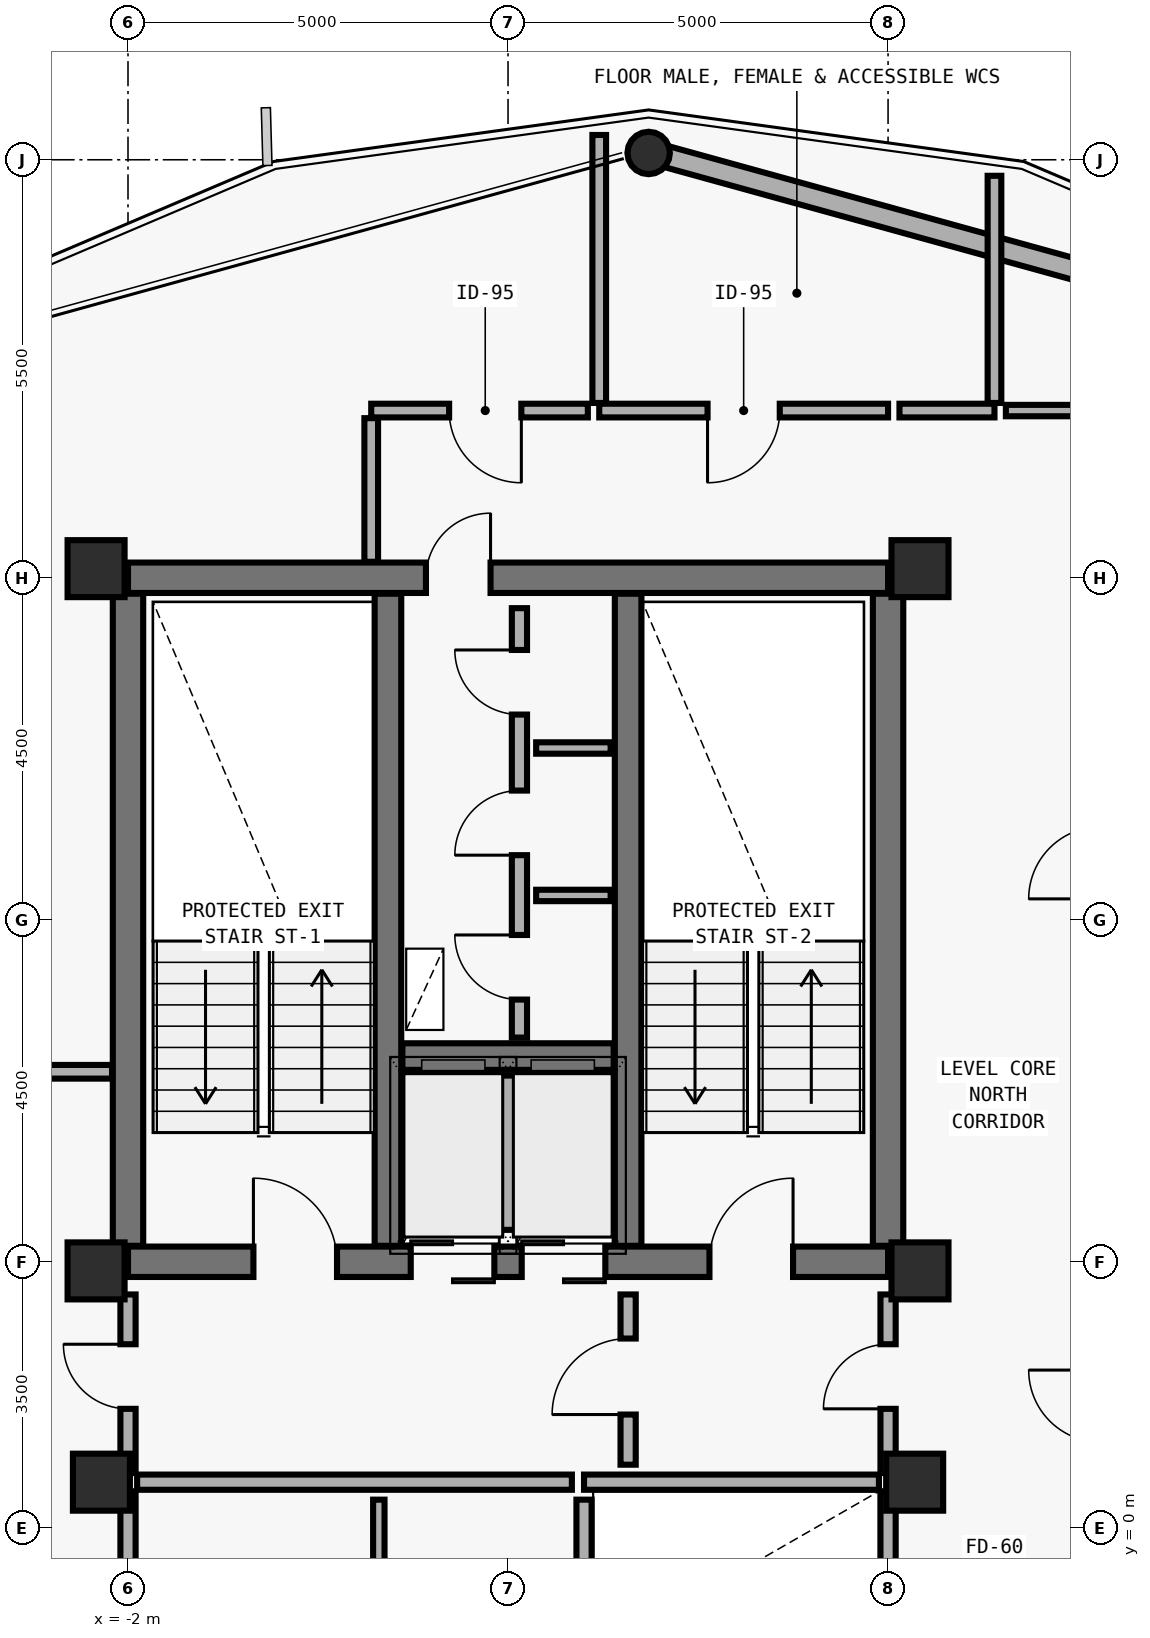
"""IFC4 building model, lengths in metres.
Left out: names, types, materials, properties, quantities, classifications, styles, units other than length and angle.
Written with IfcOpenShell. Run it as: python <this file> out.ifc"""

import sys

from ifc_helpers import new_model, si_unit, direction, frame, frame_2d, origin, origin_2d, place, context, subcontext, project, spatial, rectangle, hollow_circle, extrude, element, fill, save


model = new_model("IFC4")
c1 = context("Model", 3, precision=1e-05, world=origin(), true_north=direction((0.0, 1.0)))
c2 = subcontext(c1, "Body", "Model", "MODEL_VIEW")
j1 = project(units=[si_unit("LENGTHUNIT", "METRE"), si_unit("PLANEANGLEUNIT", "RADIAN")], contexts=[c1])
p1 = place(None, origin())
s1 = spatial("IfcSite", under=j1, at=p1, CompositionType="ELEMENT")
p2 = place(p1, origin())
s2 = spatial("IfcBuilding", under=s1, at=p2, CompositionType="ELEMENT")
p3 = place(p2, frame((0.0, 0.0, 245.4)))
s3 = spatial("IfcBuildingStorey", under=s2, at=p3, CompositionType="ELEMENT", Elevation=245.4)
p4 = place(p3, frame((-2.0, 3.5, 0.0), z_axis=(0.0, 0.0, 1.0), x_axis=(1.0, 0.0, 0.0)))
e1 = element("IfcWall", 1, at=p4, inside=s3, PredefinedType="SHEAR", context=c2, shape_type="SweptSolid", body=[
    extrude(rectangle(XDim=10.0, YDim=0.4, at=frame_2d((5.0, 0.0))), origin(), (0.0, 0.0, 1.0), 3.592),
])
p5 = place(p4, frame((1.65, 0.0, 0.0)))
e2 = element("IfcOpeningElement", 2, at=p5, cuts=e1, PredefinedType="OPENING", context=c2, shape_type="SweptSolid", body=[
    extrude(rectangle(XDim=1.1, YDim=2.15, at=frame_2d((0.55, 1.075))), frame((0.0, 0.21, 0.0), z_axis=(0.0, -1.0, 0.0), x_axis=(1.0, 0.0, 0.0)), (0.0, 0.0, 1.0), 0.42),
])
p6 = place(p4, frame((7.65, 0.0, 0.0)))
e3 = element("IfcOpeningElement", 3, at=p6, cuts=e1, PredefinedType="OPENING", context=c2, shape_type="SweptSolid", body=[
    extrude(rectangle(XDim=1.1, YDim=2.15, at=frame_2d((0.55, 1.075))), frame((0.0, 0.21, 0.0), z_axis=(0.0, -1.0, 0.0), x_axis=(1.0, 0.0, 0.0)), (0.0, 0.0, 1.0), 0.42),
])
p7 = place(p4, frame((3.72, 0.0, 0.0)))
e4 = element("IfcOpeningElement", 4, at=p7, cuts=e1, PredefinedType="OPENING", context=c2, shape_type="SweptSolid", body=[
    extrude(rectangle(XDim=1.1, YDim=2.2, at=frame_2d((0.55, 1.1))), frame((0.0, 0.21, 0.0), z_axis=(0.0, -1.0, 0.0), x_axis=(1.0, 0.0, 0.0)), (0.0, 0.0, 1.0), 0.42),
])
p8 = place(p4, frame((5.18, 0.0, 0.0)))
e5 = element("IfcOpeningElement", 5, at=p8, cuts=e1, PredefinedType="OPENING", context=c2, shape_type="SweptSolid", body=[
    extrude(rectangle(XDim=1.1, YDim=2.2, at=frame_2d((0.55, 1.1))), frame((0.0, 0.21, 0.0), z_axis=(0.0, -1.0, 0.0), x_axis=(1.0, 0.0, 0.0)), (0.0, 0.0, 1.0), 0.42),
])
p9 = place(p3, frame((-2.0, 12.5, 0.0), z_axis=(0.0, 0.0, 1.0), x_axis=(1.0, 0.0, 0.0)))
e6 = element("IfcWall", 6, at=p9, inside=s3, PredefinedType="SHEAR", context=c2, shape_type="SweptSolid", body=[
    extrude(rectangle(XDim=10.0, YDim=0.4, at=frame_2d((5.0, 0.0))), origin(), (0.0, 0.0, 1.0), 3.592),
])
p10 = place(p9, frame((3.92, 0.0, 0.0)))
e7 = element("IfcOpeningElement", 7, at=p10, cuts=e6, PredefinedType="OPENING", context=c2, shape_type="SweptSolid", body=[
    extrude(rectangle(XDim=0.85, YDim=2.1, at=frame_2d((0.425, 1.05))), frame((0.0, 0.21, 0.0), z_axis=(0.0, -1.0, 0.0), x_axis=(1.0, 0.0, 0.0)), (0.0, 0.0, 1.0), 0.42),
])
for number, where, z_axis, x_axis in (
    (8, (-2.0, 3.71, 0.0), (0.0, 0.0, 1.0), (0.0, 1.0, 0.0)),
    (9, (8.0, 3.71, 0.0), (0.0, 0.0, 1.0), (0.0, 1.0, 0.0)),
):
    element("IfcWall", number, at=place(p3, frame(where, z_axis=z_axis, x_axis=x_axis)), inside=s3, PredefinedType="SHEAR", context=c2, shape_type="SweptSolid", body=[
        extrude(rectangle(XDim=8.58, YDim=0.4, at=frame_2d((4.29, 0.0))), origin(), (0.0, 0.0, 1.0), 3.592),
    ])
for number, where, z_axis, x_axis in (
    (10, (1.42, 3.71, 0.0), (0.0, 0.0, 1.0), (0.0, 1.0, 0.0)),
    (11, (4.58, 3.71, 0.0), (0.0, 0.0, 1.0), (0.0, 1.0, 0.0)),
):
    element("IfcWall", number, at=place(p3, frame(where, z_axis=z_axis, x_axis=x_axis)), inside=s3, PredefinedType="SHEAR", context=c2, shape_type="SweptSolid", body=[
        extrude(rectangle(XDim=8.58, YDim=0.35, at=frame_2d((4.29, 0.0))), origin(), (0.0, 0.0, 1.0), 3.592),
    ])
p11 = place(p3, frame((1.61, 6.2, 0.0), z_axis=(0.0, 0.0, 1.0), x_axis=(1.0, 0.0, 0.0)))
e12 = element("IfcWall", 12, at=p11, inside=s3, PredefinedType="SHEAR", context=c2, shape_type="SweptSolid", body=[
    extrude(rectangle(XDim=2.78, YDim=0.35, at=frame_2d((1.39, 0.0))), origin(), (0.0, 0.0, 1.0), 3.592),
])
for number, where, z_axis, x_axis in (
    (13, (-2.42, 12.62, 0.0), (0.0, 0.0, 1.0), (1.0, 0.0, 0.0)),
    (14, (8.42, 12.62, 0.0), (0.0, 0.0, 1.0), (1.0, 0.0, 0.0)),
    (15, (-2.42, 3.38, 0.0), (0.0, 0.0, 1.0), (1.0, 0.0, 0.0)),
    (16, (8.42, 3.38, 0.0), (0.0, 0.0, 1.0), (1.0, 0.0, 0.0)),
    (17, (-2.35, 0.6, 0.0), (0.0, 0.0, 1.0), (1.0, 0.0, 0.0)),
    (18, (8.35, 0.6, 0.0), (0.0, 0.0, 1.0), (1.0, 0.0, 0.0)),
):
    element("IfcColumn", number, at=place(p3, frame(where, z_axis=z_axis, x_axis=x_axis)), inside=s3, PredefinedType="COLUMN", context=c2, shape_type="SweptSolid", body=[
        extrude(rectangle(XDim=0.75, YDim=0.75, at=origin_2d()), origin(), (0.0, 0.0, 1.0), 3.575),
    ])
p12 = place(p3, frame((4.85, 18.106, 0.0), z_axis=(0.0, -0.00921840097, 0.999957509639), x_axis=(1.0, 0.0, 0.0)))
e19 = element("IfcColumn", 19, at=p12, inside=s3, PredefinedType="COLUMN", context=c2, shape_type="SweptSolid", body=[
    extrude(hollow_circle(Radius=0.28, WallThickness=0.02, at=origin_2d()), origin(), (0.0, 0.0, 1.0), 3.575),
])
p13 = place(p3, frame((5.076, 18.044, 0.0), z_axis=(0.0, 0.0, 1.0), x_axis=(0.963966020106, -0.266025397435, 0.0)))
e20 = element("IfcWall", 20, at=p13, inside=s3, PredefinedType="SOLIDWALL", context=c2, shape_type="SweptSolid", body=[
    extrude(rectangle(XDim=9.089, YDim=0.28, at=frame_2d((4.545, 0.0))), origin(), (0.0, 0.0, 1.0), 2.97),
])
p14 = place(p3, frame((3.0, 3.92, 0.0), z_axis=(0.0, 0.0, 1.0), x_axis=(0.0, 1.0, 0.0)))
e21 = element("IfcWall", 21, at=p14, inside=s3, PredefinedType="SOLIDWALL", context=c2, shape_type="SweptSolid", body=[
    extrude(rectangle(XDim=2.03, YDim=0.2, at=frame_2d((1.015, 0.0))), origin(), (0.0, 0.0, 1.0), 3.36),
])
p15 = place(p3, frame((4.0, 0.6, 0.0), z_axis=(0.0, 0.0, 1.0), x_axis=(1.0, 0.0, 0.0)))
e22 = element("IfcWall", 22, at=p15, inside=s3, PredefinedType="SOLIDWALL", context=c2, shape_type="SweptSolid", body=[
    extrude(rectangle(XDim=3.88, YDim=0.2, at=frame_2d((1.94, 0.0))), origin(), (0.0, 0.0, 1.0), 3.072),
])
p16 = place(p3, frame((4.0, -1.57, 0.0), z_axis=(0.0, 0.0, 1.0), x_axis=(0.0, 1.0, 0.0)))
e23 = element("IfcWall", 23, at=p16, inside=s3, PredefinedType="SOLIDWALL", context=c2, shape_type="SweptSolid", body=[
    extrude(rectangle(XDim=1.94, YDim=0.2, at=frame_2d((0.97, 0.0))), origin(), (0.0, 0.0, 1.0), 3.36),
])
p17 = place(p3, frame((8.0, -1.57, 0.0), z_axis=(0.0, 0.0, 1.0), x_axis=(0.0, 1.0, 0.0)))
e24 = element("IfcWall", 24, at=p17, inside=s3, PredefinedType="SOLIDWALL", context=c2, shape_type="SweptSolid", body=[
    extrude(rectangle(XDim=2.05, YDim=0.2, at=frame_2d((1.025, 0.0))), origin(), (0.0, 0.0, 1.0), 3.072),
])
p18 = place(p3, frame((3.15, 6.45, 0.0), z_axis=(0.0, 0.0, 1.0), x_axis=(0.0, 1.0, 0.0)))
e25 = element("IfcWall", 25, at=p18, inside=s3, PredefinedType="MOVABLE", context=c2, shape_type="SweptSolid", body=[
    extrude(rectangle(XDim=5.65, YDim=0.2, at=frame_2d((2.825, 0.0))), origin(), (0.0, 0.0, 1.0), 3.36),
])
p19 = place(p18, frame((0.5, 0.0, 0.0)))
e26 = element("IfcOpeningElement", 26, at=p19, cuts=e25, PredefinedType="OPENING", context=c2, shape_type="SweptSolid", body=[
    extrude(rectangle(XDim=0.85, YDim=2.1, at=frame_2d((0.425, 1.05))), frame((0.0, 0.11, 0.0), z_axis=(0.0, -1.0, 0.0), x_axis=(1.0, 0.0, 0.0)), (0.0, 0.0, 1.0), 0.22),
])
p20 = place(p18, frame((2.4, 0.0, 0.0)))
e27 = element("IfcOpeningElement", 27, at=p20, cuts=e25, PredefinedType="OPENING", context=c2, shape_type="SweptSolid", body=[
    extrude(rectangle(XDim=0.85, YDim=2.1, at=frame_2d((0.425, 1.05))), frame((0.0, 0.11, 0.0), z_axis=(0.0, -1.0, 0.0), x_axis=(1.0, 0.0, 0.0)), (0.0, 0.0, 1.0), 0.22),
])
p21 = place(p18, frame((4.25, 0.0, 0.0)))
e28 = element("IfcOpeningElement", 28, at=p21, cuts=e25, PredefinedType="OPENING", context=c2, shape_type="SweptSolid", body=[
    extrude(rectangle(XDim=0.85, YDim=2.1, at=frame_2d((0.425, 1.05))), frame((0.0, 0.11, 0.0), z_axis=(0.0, -1.0, 0.0), x_axis=(1.0, 0.0, 0.0)), (0.0, 0.0, 1.0), 0.22),
])
p22 = place(p3, frame((4.58, 0.83, 0.0), z_axis=(0.0, 0.0, 1.0), x_axis=(0.0, 1.0, 0.0)))
e29 = element("IfcWall", 29, at=p22, inside=s3, PredefinedType="MOVABLE", context=c2, shape_type="SweptSolid", body=[
    extrude(rectangle(XDim=2.24, YDim=0.2, at=frame_2d((1.12, 0.0))), origin(), (0.0, 0.0, 1.0), 3.36),
])
p23 = place(p22, frame((0.66, 0.0, 0.0)))
e30 = element("IfcOpeningElement", 30, at=p23, cuts=e29, PredefinedType="OPENING", context=c2, shape_type="SweptSolid", body=[
    extrude(rectangle(XDim=1.0, YDim=2.1, at=frame_2d((0.5, 1.05))), frame((0.0, 0.11, 0.0), z_axis=(0.0, -1.0, 0.0), x_axis=(1.0, 0.0, 0.0)), (0.0, 0.0, 1.0), 0.22),
])
p24 = place(p3, frame((-2.0, 0.72, 0.0), z_axis=(0.0, 0.0, 1.0), x_axis=(0.0, 1.0, 0.0)))
e31 = element("IfcWall", 31, at=p24, inside=s3, PredefinedType="MOVABLE", context=c2, shape_type="SweptSolid", body=[
    extrude(rectangle(XDim=2.35, YDim=0.2, at=frame_2d((1.175, 0.0))), origin(), (0.0, 0.0, 1.0), 2.692),
])
p25 = place(p24, frame((0.845, 0.0, 0.0)))
e32 = element("IfcOpeningElement", 32, at=p25, cuts=e31, PredefinedType="OPENING", context=c2, shape_type="SweptSolid", body=[
    extrude(rectangle(XDim=0.85, YDim=2.1, at=frame_2d((0.425, 1.05))), frame((0.0, 0.11, 0.0), z_axis=(0.0, -1.0, 0.0), x_axis=(1.0, 0.0, 0.0)), (0.0, 0.0, 1.0), 0.22),
])
p26 = place(p3, frame((8.0, 0.72, 0.0), z_axis=(0.0, 0.0, 1.0), x_axis=(0.0, 1.0, 0.0)))
e33 = element("IfcWall", 33, at=p26, inside=s3, PredefinedType="MOVABLE", context=c2, shape_type="SweptSolid", body=[
    extrude(rectangle(XDim=2.35, YDim=0.2, at=frame_2d((1.175, 0.0))), origin(), (0.0, 0.0, 1.0), 2.692),
])
p27 = place(p26, frame((0.845, 0.0, 0.0)))
e34 = element("IfcOpeningElement", 34, at=p27, cuts=e33, PredefinedType="OPENING", context=c2, shape_type="SweptSolid", body=[
    extrude(rectangle(XDim=0.85, YDim=2.1, at=frame_2d((0.425, 1.05))), frame((0.0, 0.11, 0.0), z_axis=(0.0, -1.0, 0.0), x_axis=(1.0, 0.0, 0.0)), (0.0, 0.0, 1.0), 0.22),
])
p28 = place(p3, frame((8.0, 14.7, 0.0), z_axis=(0.0, 0.0, 1.0), x_axis=(-1.0, 0.0, 0.0)))
e35 = element("IfcWall", 35, at=p28, inside=s3, PredefinedType="PLUMBINGWALL", context=c2, shape_type="SweptSolid", body=[
    extrude(rectangle(XDim=3.8, YDim=0.18, at=frame_2d((1.9, 0.0))), origin(), (0.0, 0.0, 1.0), 3.072),
])
p29 = place(p28, frame((1.425, 0.0, 0.0)))
e36 = element("IfcOpeningElement", 36, at=p29, cuts=e35, PredefinedType="OPENING", context=c2, shape_type="SweptSolid", body=[
    extrude(rectangle(XDim=0.95, YDim=2.1, at=frame_2d((0.475, 1.05))), frame((0.0, 0.1, 0.0), z_axis=(0.0, -1.0, 0.0), x_axis=(1.0, 0.0, 0.0)), (0.0, 0.0, 1.0), 0.2),
])
p30 = place(p3, frame((4.05, 14.7, 0.0), z_axis=(0.0, 0.0, 1.0), x_axis=(-1.0, 0.0, 0.0)))
e37 = element("IfcWall", 37, at=p30, inside=s3, PredefinedType="PLUMBINGWALL", context=c2, shape_type="SweptSolid", body=[
    extrude(rectangle(XDim=2.85, YDim=0.18, at=frame_2d((1.425, 0.0))), origin(), (0.0, 0.0, 1.0), 3.072),
])
p31 = place(p30, frame((0.875, 0.0, 0.0)))
e38 = element("IfcOpeningElement", 38, at=p31, cuts=e37, PredefinedType="OPENING", context=c2, shape_type="SweptSolid", body=[
    extrude(rectangle(XDim=0.95, YDim=2.1, at=frame_2d((0.475, 1.05))), frame((0.0, 0.1, 0.0), z_axis=(0.0, -1.0, 0.0), x_axis=(1.0, 0.0, 0.0)), (0.0, 0.0, 1.0), 0.2),
])
for number, where, z_axis, x_axis in (
    (39, (3.37, 8.32, 0.0), (0.0, 0.0, 1.0), (1.0, 0.0, 0.0)),
    (40, (3.37, 10.26, 0.0), (0.0, 0.0, 1.0), (1.0, 0.0, 0.0)),
):
    element("IfcWall", number, at=place(p3, frame(where, z_axis=z_axis, x_axis=x_axis)), inside=s3, PredefinedType="PARTITIONING", context=c2, shape_type="SweptSolid", body=[
        extrude(rectangle(XDim=0.98, YDim=0.15, at=frame_2d((0.49, 0.0))), origin(), (0.0, 0.0, 1.0), 3.36),
    ])
p32 = place(p3, frame((-1.88, 0.6, 0.0), z_axis=(0.0, 0.0, 1.0), x_axis=(1.0, 0.0, 0.0)))
e41 = element("IfcWall", 41, at=p32, inside=s3, PredefinedType="MOVABLE", context=c2, shape_type="SweptSolid", body=[
    extrude(rectangle(XDim=5.72, YDim=0.2, at=frame_2d((2.86, 0.0))), origin(), (0.0, 0.0, 1.0), 3.072),
])
p33 = place(p3, frame((1.3, -1.57, 0.0), z_axis=(0.0, 0.0, 1.0), x_axis=(0.0, 1.0, 0.0)))
e42 = element("IfcWall", 42, at=p33, inside=s3, PredefinedType="PARTITIONING", context=c2, shape_type="SweptSolid", body=[
    extrude(rectangle(XDim=1.94, YDim=0.15, at=frame_2d((0.97, 0.0))), origin(), (0.0, 0.0, 1.0), 3.36),
])
p34 = place(p3, frame((-2.0, -1.68, 0.0), z_axis=(0.0, 0.0, 1.0), x_axis=(0.0, 1.0, 0.0)))
e43 = element("IfcWall", 43, at=p34, inside=s3, PredefinedType="MOVABLE", context=c2, shape_type="SweptSolid", body=[
    extrude(rectangle(XDim=2.16, YDim=0.2, at=frame_2d((1.08, 0.0))), origin(), (0.0, 0.0, 1.0), 3.072),
])
p35 = place(p3, frame((9.4, 14.7, 0.0), z_axis=(0.0, 0.0, 1.0), x_axis=(-1.0, 0.0, 0.0)))
e44 = element("IfcWall", 44, at=p35, inside=s3, PredefinedType="PLUMBINGWALL", context=c2, shape_type="SweptSolid", body=[
    extrude(rectangle(XDim=1.25, YDim=0.18, at=frame_2d((0.625, 0.0))), origin(), (0.0, 0.0, 1.0), 3.072),
])
p36 = place(p3, frame((1.2, 14.6, 0.0), z_axis=(0.0, 0.0, 1.0), x_axis=(0.0, -1.0, 0.0)))
e45 = element("IfcWall", 45, at=p36, inside=s3, PredefinedType="PLUMBINGWALL", context=c2, shape_type="SweptSolid", body=[
    extrude(rectangle(XDim=1.89, YDim=0.18, at=frame_2d((0.945, 0.0))), origin(), (0.0, 0.0, 1.0), 3.36),
])
p37 = place(p3, frame((-2.21, 6.0, 0.0), z_axis=(0.0, 0.0, 1.0), x_axis=(-1.0, 0.0, 0.0)))
e46 = element("IfcWall", 46, at=p37, inside=s3, PredefinedType="PLUMBINGWALL", context=c2, shape_type="SweptSolid", body=[
    extrude(rectangle(XDim=2.39, YDim=0.18, at=frame_2d((1.195, 0.0))), origin(), (0.0, 0.0, 1.0), 3.36),
])
p38 = place(p3, frame((4.2, 18.326, 0.0), z_axis=(0.0, 0.0, 1.0), x_axis=(0.0, -1.0, 0.0)))
e47 = element("IfcWall", 47, at=p38, inside=s3, PredefinedType="PLUMBINGWALL", context=c2, shape_type="SweptSolid", body=[
    extrude(rectangle(XDim=3.526, YDim=0.18, at=frame_2d((1.763, 0.0))), origin(), (0.0, 0.0, 1.0), 3.36),
])
p39 = place(p3, frame((10.715, 14.7, 0.0), z_axis=(0.0, 0.0, 1.0), x_axis=(-1.0, 0.0, 0.0)))
e48 = element("IfcWall", 48, at=p39, inside=s3, PredefinedType="PARTITIONING", context=c2, shape_type="SweptSolid", body=[
    extrude(rectangle(XDim=1.165, YDim=0.15, at=frame_2d((0.583, 0.0))), origin(), (0.0, 0.0, 1.0), 3.072),
])
p40 = place(p3, frame((9.4, 14.8, 0.0), z_axis=(0.0, 0.0, 1.0), x_axis=(0.0, 1.0, 0.0)))
e49 = element("IfcWall", 49, at=p40, inside=s3, PredefinedType="PLUMBINGWALL", context=c2, shape_type="SweptSolid", body=[
    extrude(rectangle(XDim=2.989, YDim=0.18, at=frame_2d((1.495, 0.0))), origin(), (0.0, 0.0, 1.0), 3.36),
])
p41 = place(p5, origin())
e50 = element("IfcDoor", 50, at=p41, inside=s3, OperationType="SINGLE_SWING_LEFT", PredefinedType="DOOR", context=c2, shape_type="SweptSolid", body=[
    extrude(rectangle(XDim=1.1, YDim=2.15, at=frame_2d((0.55, 1.075))), frame((0.0, 0.025, 0.0), z_axis=(0.0, -1.0, 0.0), x_axis=(1.0, 0.0, 0.0)), (0.0, 0.0, 1.0), 0.05),
])
fill(e2, e50)
p42 = place(p6, origin())
e51 = element("IfcDoor", 51, at=p42, inside=s3, OperationType="SINGLE_SWING_RIGHT", PredefinedType="DOOR", context=c2, shape_type="SweptSolid", body=[
    extrude(rectangle(XDim=1.1, YDim=2.15, at=frame_2d((0.55, 1.075))), frame((0.0, 0.025, 0.0), z_axis=(0.0, -1.0, 0.0), x_axis=(1.0, 0.0, 0.0)), (0.0, 0.0, 1.0), 0.05),
])
fill(e3, e51)
p43 = place(p7, origin())
e52 = element("IfcDoor", 52, at=p43, inside=s3, OperationType="DOUBLE_DOOR_SLIDING", PredefinedType="DOOR", context=c2, shape_type="SweptSolid", body=[
    extrude(rectangle(XDim=1.1, YDim=2.2, at=frame_2d((0.55, 1.1))), frame((0.0, 0.025, 0.0), z_axis=(0.0, -1.0, 0.0), x_axis=(1.0, 0.0, 0.0)), (0.0, 0.0, 1.0), 0.05),
])
fill(e4, e52)
p44 = place(p8, origin())
e53 = element("IfcDoor", 53, at=p44, inside=s3, OperationType="DOUBLE_DOOR_SLIDING", PredefinedType="DOOR", context=c2, shape_type="SweptSolid", body=[
    extrude(rectangle(XDim=1.1, YDim=2.2, at=frame_2d((0.55, 1.1))), frame((0.0, 0.025, 0.0), z_axis=(0.0, -1.0, 0.0), x_axis=(1.0, 0.0, 0.0)), (0.0, 0.0, 1.0), 0.05),
])
fill(e5, e53)
p45 = place(p10, origin())
e54 = element("IfcDoor", 54, at=p45, inside=s3, OperationType="SINGLE_SWING_RIGHT", PredefinedType="DOOR", context=c2, shape_type="SweptSolid", body=[
    extrude(rectangle(XDim=0.85, YDim=2.1, at=frame_2d((0.425, 1.05))), frame((0.0, 0.025, 0.0), z_axis=(0.0, -1.0, 0.0), x_axis=(1.0, 0.0, 0.0)), (0.0, 0.0, 1.0), 0.05),
])
fill(e7, e54)
p46 = place(p19, origin())
e55 = element("IfcDoor", 55, at=p46, inside=s3, OperationType="SINGLE_SWING_RIGHT", PredefinedType="DOOR", context=c2, shape_type="SweptSolid", body=[
    extrude(rectangle(XDim=0.85, YDim=2.1, at=frame_2d((0.425, 1.05))), frame((0.0, 0.025, 0.0), z_axis=(0.0, -1.0, 0.0), x_axis=(1.0, 0.0, 0.0)), (0.0, 0.0, 1.0), 0.05),
])
fill(e26, e55)
p47 = place(p20, origin())
e56 = element("IfcDoor", 56, at=p47, inside=s3, OperationType="SINGLE_SWING_LEFT", PredefinedType="DOOR", context=c2, shape_type="SweptSolid", body=[
    extrude(rectangle(XDim=0.85, YDim=2.1, at=frame_2d((0.425, 1.05))), frame((0.0, 0.025, 0.0), z_axis=(0.0, -1.0, 0.0), x_axis=(1.0, 0.0, 0.0)), (0.0, 0.0, 1.0), 0.05),
])
fill(e27, e56)
p48 = place(p21, origin())
e57 = element("IfcDoor", 57, at=p48, inside=s3, OperationType="SINGLE_SWING_RIGHT", PredefinedType="DOOR", context=c2, shape_type="SweptSolid", body=[
    extrude(rectangle(XDim=0.85, YDim=2.1, at=frame_2d((0.425, 1.05))), frame((0.0, 0.025, 0.0), z_axis=(0.0, -1.0, 0.0), x_axis=(1.0, 0.0, 0.0)), (0.0, 0.0, 1.0), 0.05),
])
fill(e28, e57)
p49 = place(p23, origin())
e58 = element("IfcDoor", 58, at=p49, inside=s3, OperationType="SINGLE_SWING_LEFT", PredefinedType="DOOR", context=c2, shape_type="SweptSolid", body=[
    extrude(rectangle(XDim=1.0, YDim=2.1, at=frame_2d((0.5, 1.05))), frame((0.0, 0.025, 0.0), z_axis=(0.0, -1.0, 0.0), x_axis=(1.0, 0.0, 0.0)), (0.0, 0.0, 1.0), 0.05),
])
fill(e30, e58)
p50 = place(p25, origin())
e59 = element("IfcDoor", 59, at=p50, inside=s3, OperationType="SINGLE_SWING_RIGHT", PredefinedType="DOOR", context=c2, shape_type="SweptSolid", body=[
    extrude(rectangle(XDim=0.85, YDim=2.1, at=frame_2d((0.425, 1.05))), frame((0.0, 0.025, 0.0), z_axis=(0.0, -1.0, 0.0), x_axis=(1.0, 0.0, 0.0)), (0.0, 0.0, 1.0), 0.05),
])
fill(e32, e59)
p51 = place(p27, origin())
e60 = element("IfcDoor", 60, at=p51, inside=s3, OperationType="SINGLE_SWING_LEFT", PredefinedType="DOOR", context=c2, shape_type="SweptSolid", body=[
    extrude(rectangle(XDim=0.85, YDim=2.1, at=frame_2d((0.425, 1.05))), frame((0.0, 0.025, 0.0), z_axis=(0.0, -1.0, 0.0), x_axis=(1.0, 0.0, 0.0)), (0.0, 0.0, 1.0), 0.05),
])
fill(e34, e60)
p52 = place(p29, origin())
e61 = element("IfcDoor", 61, at=p52, inside=s3, OperationType="SINGLE_SWING_RIGHT", PredefinedType="DOOR", context=c2, shape_type="SweptSolid", body=[
    extrude(rectangle(XDim=0.95, YDim=2.1, at=frame_2d((0.475, 1.05))), frame((0.0, 0.025, 0.0), z_axis=(0.0, -1.0, 0.0), x_axis=(1.0, 0.0, 0.0)), (0.0, 0.0, 1.0), 0.05),
])
fill(e36, e61)
p53 = place(p31, origin())
e62 = element("IfcDoor", 62, at=p53, inside=s3, OperationType="SINGLE_SWING_LEFT", PredefinedType="DOOR", context=c2, shape_type="SweptSolid", body=[
    extrude(rectangle(XDim=0.95, YDim=2.1, at=frame_2d((0.475, 1.05))), frame((0.0, 0.025, 0.0), z_axis=(0.0, -1.0, 0.0), x_axis=(1.0, 0.0, 0.0)), (0.0, 0.0, 1.0), 0.05),
])
fill(e38, e62)
save(model, sys.argv[1])
